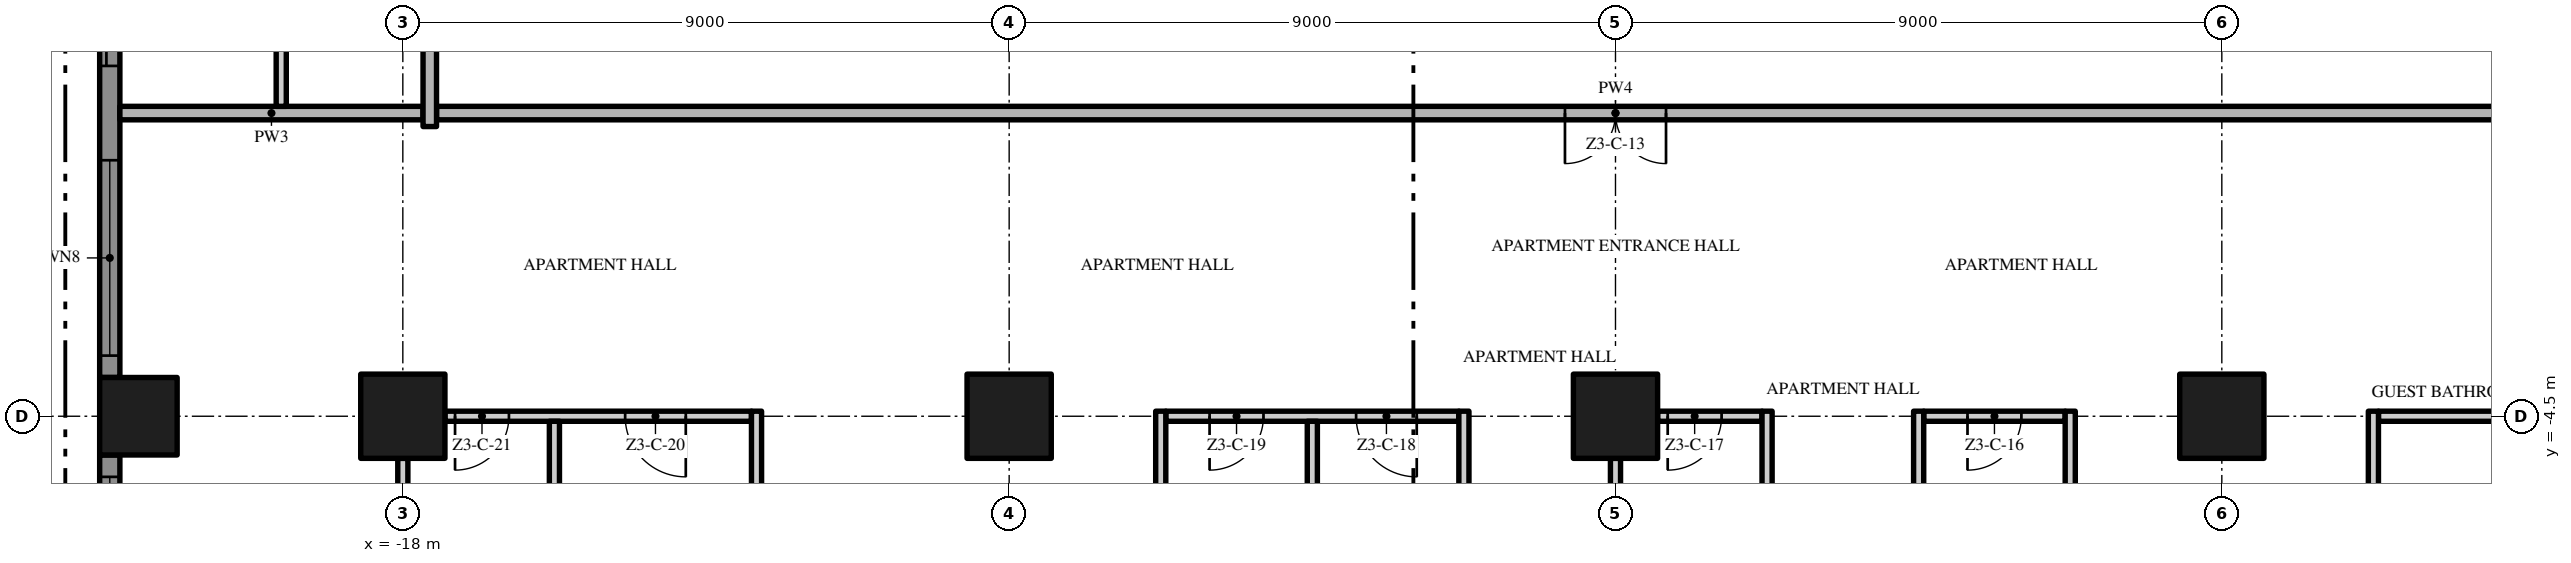
"""IFC4 building model, lengths in metres.
Left out: names, types, materials, properties, quantities, classifications, styles, units other than length and angle.
Written with IfcOpenShell. Run it as: python <this file> out.ifc"""

import sys

from ifc_helpers import new_model, si_unit, direction, frame, frame_2d, origin, origin_2d, place, context, subcontext, project, spatial, polyline, rectangle, outline, extrude, element, fill, save


model = new_model("IFC4")
c1 = context("Model", 3, precision=1e-05, world=origin(), true_north=direction((0.0, 1.0)))
c2 = subcontext(c1, "Body", "Model", "MODEL_VIEW")
j1 = project(units=[si_unit("LENGTHUNIT", "METRE"), si_unit("PLANEANGLEUNIT", "RADIAN")], contexts=[c1])
p1 = place(None, origin())
s1 = spatial("IfcSite", under=j1, at=p1, CompositionType="ELEMENT")
p2 = place(p1, origin())
s2 = spatial("IfcBuilding", under=s1, at=p2, CompositionType="ELEMENT")
p3 = place(p2, frame((0.0, 0.0, 147.8)))
s3 = spatial("IfcBuildingStorey", under=s2, at=p3, CompositionType="ELEMENT", Elevation=147.8)
p4 = place(p3, frame((-18.0, -4.5, 0.0), z_axis=(0.0, 0.0, 1.0), x_axis=(1.0, 0.0, 0.0)))
e1 = element("IfcColumn", 1, at=p4, inside=s3, PredefinedType="COLUMN", context=c2, shape_type="SweptSolid", body=[
    extrude(rectangle(XDim=1.25, YDim=1.25, at=origin_2d()), origin(), (0.0, 0.0, 1.0), 3.5),
])
p5 = place(p3, frame((-21.925, -4.5, 0.0), z_axis=(0.0, 0.0, 1.0), x_axis=(1.0, 0.0, 0.0)))
e2 = element("IfcColumn", 2, at=p5, inside=s3, PredefinedType="COLUMN", context=c2, shape_type="SweptSolid", body=[
    extrude(rectangle(XDim=1.15, YDim=1.15, at=origin_2d()), origin(), (0.0, 0.0, 1.0), 3.5),
])
for number, where, z_axis, x_axis in (
    (3, (-9.0, -4.5, 0.0), (0.0, 0.0, 1.0), (1.0, 0.0, 0.0)),
    (4, (0.0, -4.5, 0.0), (0.0, 0.0, 1.0), (1.0, 0.0, 0.0)),
    (5, (9.0, -4.5, 0.0), (0.0, 0.0, 1.0), (1.0, 0.0, 0.0)),
):
    element("IfcColumn", number, at=place(p3, frame(where, z_axis=z_axis, x_axis=x_axis)), inside=s3, PredefinedType="COLUMN", context=c2, shape_type="SweptSolid", body=[
        extrude(rectangle(XDim=1.25, YDim=1.25, at=origin_2d()), origin(), (0.0, 0.0, 1.0), 3.5),
    ])
p6 = place(p3, frame((-22.35, -3.925, 0.0), z_axis=(0.0, 0.0, 1.0), x_axis=(0.0, 1.0, 0.0)))
e6 = element("IfcWall", 6, at=p6, inside=s3, PredefinedType="SOLIDWALL", context=c2, shape_type="SweptSolid", body=[
    extrude(rectangle(XDim=7.85, YDim=0.3, at=frame_2d((3.925, 0.0))), origin(), (0.0, 0.0, 1.0), 3.5),
])
p7 = place(p6, frame((4.625, 0.0, 0.0)))
e7 = element("IfcOpeningElement", 7, at=p7, cuts=e6, PredefinedType="OPENING", context=c2, shape_type="SweptSolid", body=[
    extrude(rectangle(XDim=2.9, YDim=2.4, at=frame_2d((1.45, 1.2))), frame((0.0, 0.16, 0.0), z_axis=(0.0, -1.0, 0.0), x_axis=(1.0, 0.0, 0.0)), (0.0, 0.0, 1.0), 0.32),
])
p8 = place(p6, frame((0.325, 0.0, 0.45)))
e8 = element("IfcOpeningElement", 8, at=p8, cuts=e6, PredefinedType="OPENING", context=c2, shape_type="SweptSolid", body=[
    extrude(rectangle(XDim=2.9, YDim=2.65, at=frame_2d((1.45, 1.325))), frame((0.0, 0.16, 0.0), z_axis=(0.0, -1.0, 0.0), x_axis=(1.0, 0.0, 0.0)), (0.0, 0.0, 1.0), 0.32),
])
p9 = place(p3, frame((-22.35, -12.35, 0.0), z_axis=(0.0, 0.0, 1.0), x_axis=(0.0, 1.0, 0.0)))
e9 = element("IfcWall", 9, at=p9, inside=s3, PredefinedType="SOLIDWALL", context=c2, shape_type="SweptSolid", body=[
    extrude(rectangle(XDim=7.275, YDim=0.3, at=frame_2d((3.638, 0.0))), origin(), (0.0, 0.0, 1.0), 3.5),
])
p10 = place(p9, frame((4.05, 0.0, 0.45)))
e10 = element("IfcOpeningElement", 10, at=p10, cuts=e9, PredefinedType="OPENING", context=c2, shape_type="SweptSolid", body=[
    extrude(rectangle(XDim=2.9, YDim=2.65, at=frame_2d((1.45, 1.325))), frame((0.0, 0.16, 0.0), z_axis=(0.0, -1.0, 0.0), x_axis=(1.0, 0.0, 0.0)), (0.0, 0.0, 1.0), 0.32),
])
p11 = place(p9, frame((0.3, 0.0, 0.0)))
e11 = element("IfcOpeningElement", 11, at=p11, cuts=e9, PredefinedType="OPENING", context=c2, shape_type="SweptSolid", body=[
    extrude(rectangle(XDim=2.35, YDim=2.4, at=frame_2d((1.175, 1.2))), frame((0.0, 0.16, 0.0), z_axis=(0.0, -1.0, 0.0), x_axis=(1.0, 0.0, 0.0)), (0.0, 0.0, 1.0), 0.32),
])
p12 = place(p3, origin())
e12 = element("IfcWall", 12, at=p12, inside=s3, PredefinedType="USERDEFINED", context=c2, shape_type="SweptSolid", body=[
    extrude(outline(polyline([(-25.149, 18.0), (-25.485, 16.5), (-25.5, 16.125), (-25.369, 15.0), (-24.845, 13.5), (-24.112, 12.0), (-23.451, 10.5), (-23.115, 9.0), (-23.1, 8.625), (-23.231, 7.5), (-23.755, 6.0), (-24.488, 4.5), (-25.149, 3.0), (-25.485, 1.5), (-25.5, 1.125), (-25.369, 0.0), (-24.845, -1.5), (-24.112, -3.0), (-23.451, -4.5), (-23.115, -6.0), (-23.1, -6.375), (-23.231, -7.5), (-23.755, -9.0), (-24.488, -10.5), (-25.149, -12.0), (-25.485, -13.5), (-25.241, -13.555), (-24.91, -12.079), (-24.261, -10.605), (-23.524, -9.096), (-22.986, -7.556), (-22.849, -6.385), (-22.866, -5.967), (-23.213, -4.421), (-23.885, -2.895), (-24.614, -1.404), (-25.124, 0.056), (-25.249, 1.135), (-25.236, 1.467), (-24.91, 2.921), (-24.261, 4.395), (-23.524, 5.904), (-22.986, 7.444), (-22.849, 8.615), (-22.866, 9.033), (-23.213, 10.579), (-23.885, 12.105), (-24.614, 13.596), (-25.124, 15.056), (-25.249, 16.135), (-25.236, 16.467), (-24.905, 17.945), (-25.149, 18.0)])), origin(), (0.0, 0.0, 1.0), 0.9),
])
p13 = place(p3, frame((-12.825, -4.5, 0.0), z_axis=(0.0, 0.0, 1.0), x_axis=(-1.0, 0.0, 0.0)))
e13 = element("IfcWall", 13, at=p13, inside=s3, PredefinedType="PARTITIONING", context=c2, shape_type="SweptSolid", body=[
    extrude(rectangle(XDim=4.55, YDim=0.15, at=frame_2d((2.275, 0.0))), origin(), (0.0, 0.0, 1.0), 3.5),
])
p14 = place(p13, frame((0.975, 0.0, 0.0)))
e14 = element("IfcOpeningElement", 14, at=p14, cuts=e13, PredefinedType="OPENING", context=c2, shape_type="SweptSolid", body=[
    extrude(rectangle(XDim=0.9, YDim=2.1, at=frame_2d((0.45, 1.05))), frame((0.0, 0.085, 0.0), z_axis=(0.0, -1.0, 0.0), x_axis=(1.0, 0.0, 0.0)), (0.0, 0.0, 1.0), 0.17),
])
p15 = place(p13, frame((3.6, 0.0, 0.0)))
e15 = element("IfcOpeningElement", 15, at=p15, cuts=e13, PredefinedType="OPENING", context=c2, shape_type="SweptSolid", body=[
    extrude(rectangle(XDim=0.8, YDim=2.0, at=frame_2d((0.4, 1.0))), frame((0.0, 0.085, 0.0), z_axis=(0.0, -1.0, 0.0), x_axis=(1.0, 0.0, 0.0)), (0.0, 0.0, 1.0), 0.17),
])
p16 = place(p3, frame((-2.325, -4.5, 0.0), z_axis=(0.0, 0.0, 1.0), x_axis=(-1.0, 0.0, 0.0)))
e16 = element("IfcWall", 16, at=p16, inside=s3, PredefinedType="PARTITIONING", context=c2, shape_type="SweptSolid", body=[
    extrude(rectangle(XDim=4.35, YDim=0.15, at=frame_2d((2.175, 0.0))), origin(), (0.0, 0.0, 1.0), 3.5),
])
p17 = place(p16, frame((0.625, 0.0, 0.0)))
e17 = element("IfcOpeningElement", 17, at=p17, cuts=e16, PredefinedType="OPENING", context=c2, shape_type="SweptSolid", body=[
    extrude(rectangle(XDim=0.9, YDim=2.1, at=frame_2d((0.45, 1.05))), frame((0.0, 0.085, 0.0), z_axis=(0.0, -1.0, 0.0), x_axis=(1.0, 0.0, 0.0)), (0.0, 0.0, 1.0), 0.17),
])
p18 = place(p16, frame((2.9, 0.0, 0.0)))
e18 = element("IfcOpeningElement", 18, at=p18, cuts=e16, PredefinedType="OPENING", context=c2, shape_type="SweptSolid", body=[
    extrude(rectangle(XDim=0.8, YDim=2.0, at=frame_2d((0.4, 1.0))), frame((0.0, 0.085, 0.0), z_axis=(0.0, -1.0, 0.0), x_axis=(1.0, 0.0, 0.0)), (0.0, 0.0, 1.0), 0.17),
])
p19 = place(p3, frame((2.175, -4.5, 0.0), z_axis=(0.0, 0.0, 1.0), x_axis=(-1.0, 0.0, 0.0)))
e19 = element("IfcWall", 19, at=p19, inside=s3, PredefinedType="PARTITIONING", context=c2, shape_type="SweptSolid", body=[
    extrude(rectangle(XDim=1.55, YDim=0.15, at=frame_2d((0.775, 0.0))), origin(), (0.0, 0.0, 1.0), 3.5),
])
p20 = place(p19, frame((0.6, 0.0, 0.0)))
e20 = element("IfcOpeningElement", 20, at=p20, cuts=e19, PredefinedType="OPENING", context=c2, shape_type="SweptSolid", body=[
    extrude(rectangle(XDim=0.8, YDim=2.0, at=frame_2d((0.4, 1.0))), frame((0.0, 0.085, 0.0), z_axis=(0.0, -1.0, 0.0), x_axis=(1.0, 0.0, 0.0)), (0.0, 0.0, 1.0), 0.17),
])
p21 = place(p3, frame((6.675, -4.5, 0.0), z_axis=(0.0, 0.0, 1.0), x_axis=(-1.0, 0.0, 0.0)))
e21 = element("IfcWall", 21, at=p21, inside=s3, PredefinedType="PARTITIONING", context=c2, shape_type="SweptSolid", body=[
    extrude(rectangle(XDim=2.1, YDim=0.15, at=frame_2d((1.05, 0.0))), origin(), (0.0, 0.0, 1.0), 3.5),
])
p22 = place(p21, frame((0.65, 0.0, 0.0)))
e22 = element("IfcOpeningElement", 22, at=p22, cuts=e21, PredefinedType="OPENING", context=c2, shape_type="SweptSolid", body=[
    extrude(rectangle(XDim=0.8, YDim=2.0, at=frame_2d((0.4, 1.0))), frame((0.0, 0.085, 0.0), z_axis=(0.0, -1.0, 0.0), x_axis=(1.0, 0.0, 0.0)), (0.0, 0.0, 1.0), 0.17),
])
p23 = place(p3, frame((11.325, -4.5, 0.0), z_axis=(0.0, 0.0, 1.0), x_axis=(1.0, 0.0, 0.0)))
e23 = element("IfcWall", 23, at=p23, inside=s3, PredefinedType="PARTITIONING", context=c2, shape_type="SweptSolid", body=[
    extrude(rectangle(XDim=2.1, YDim=0.15, at=frame_2d((1.05, 0.0))), origin(), (0.0, 0.0, 1.0), 3.5),
])
p24 = place(p3, frame((17.5, 0.0, 0.0), z_axis=(0.0, 0.0, 1.0), x_axis=(-1.0, 0.0, 0.0)))
e24 = element("IfcWall", 24, at=p24, inside=s3, PredefinedType="PARTITIONING", context=c2, shape_type="SweptSolid", body=[
    extrude(rectangle(XDim=35.0, YDim=0.2, at=frame_2d((17.5, 0.0))), origin(), (0.0, 0.0, 1.0), 3.5),
])
p25 = place(p24, frame((16.75, 0.0, 0.0)))
e25 = element("IfcOpeningElement", 25, at=p25, cuts=e24, PredefinedType="OPENING", context=c2, shape_type="SweptSolid", body=[
    extrude(rectangle(XDim=1.5, YDim=2.4, at=frame_2d((0.75, 1.2))), frame((0.0, 0.11, 0.0), z_axis=(0.0, -1.0, 0.0), x_axis=(1.0, 0.0, 0.0)), (0.0, 0.0, 1.0), 0.22),
])
p26 = place(p3, frame((-22.2, 0.0, 0.0), z_axis=(0.0, 0.0, 1.0), x_axis=(1.0, 0.0, 0.0)))
e26 = element("IfcWall", 26, at=p26, inside=s3, PredefinedType="PARTITIONING", context=c2, shape_type="SweptSolid", body=[
    extrude(rectangle(XDim=4.5, YDim=0.2, at=frame_2d((2.25, 0.0))), origin(), (0.0, 0.0, 1.0), 3.5),
])
p27 = place(p3, frame((-19.805, 0.1, 0.0), z_axis=(0.0, 0.0, 1.0), x_axis=(0.0, 1.0, 0.0)))
e27 = element("IfcWall", 27, at=p27, inside=s3, PredefinedType="PARTITIONING", context=c2, shape_type="SweptSolid", body=[
    extrude(rectangle(XDim=2.225, YDim=0.15, at=frame_2d((1.113, 0.0))), origin(), (0.0, 0.0, 1.0), 3.5),
])
p28 = place(p3, frame((-18.0, -12.875, 0.0), z_axis=(0.0, 0.0, 1.0), x_axis=(0.0, 1.0, 0.0)))
e28 = element("IfcWall", 28, at=p28, inside=s3, PredefinedType="PARTITIONING", context=c2, shape_type="SweptSolid", body=[
    extrude(rectangle(XDim=7.75, YDim=0.15, at=frame_2d((3.875, 0.0))), origin(), (0.0, 0.0, 1.0), 3.5),
])
p29 = place(p3, frame((-17.6, -0.2, 0.0), z_axis=(0.0, 0.0, 1.0), x_axis=(0.0, 1.0, 0.0)))
e29 = element("IfcWall", 29, at=p29, inside=s3, PredefinedType="PARTITIONING", context=c2, shape_type="SweptSolid", body=[
    extrude(rectangle(XDim=4.075, YDim=0.2, at=frame_2d((2.038, 0.0))), origin(), (0.0, 0.0, 1.0), 3.5),
])
p30 = place(p3, frame((-15.75, -8.925, 0.0), z_axis=(0.0, 0.0, 1.0), x_axis=(0.0, 1.0, 0.0)))
e30 = element("IfcWall", 30, at=p30, inside=s3, PredefinedType="PARTITIONING", context=c2, shape_type="SweptSolid", body=[
    extrude(rectangle(XDim=4.35, YDim=0.15, at=frame_2d((2.175, 0.0))), origin(), (0.0, 0.0, 1.0), 3.5),
])
p31 = place(p3, frame((-12.75, -8.925, 0.0), z_axis=(0.0, 0.0, 1.0), x_axis=(0.0, 1.0, 0.0)))
e31 = element("IfcWall", 31, at=p31, inside=s3, PredefinedType="PARTITIONING", context=c2, shape_type="SweptSolid", body=[
    extrude(rectangle(XDim=4.5, YDim=0.15, at=frame_2d((2.25, 0.0))), origin(), (0.0, 0.0, 1.0), 3.5),
])
p32 = place(p3, frame((-6.75, -12.075, 0.0), z_axis=(0.0, 0.0, 1.0), x_axis=(0.0, 1.0, 0.0)))
e32 = element("IfcWall", 32, at=p32, inside=s3, PredefinedType="PARTITIONING", context=c2, shape_type="SweptSolid", body=[
    extrude(rectangle(XDim=7.65, YDim=0.15, at=frame_2d((3.825, 0.0))), origin(), (0.0, 0.0, 1.0), 3.5),
])
p33 = place(p3, frame((-4.5, -17.7, 0.0), z_axis=(0.0, 0.0, 1.0), x_axis=(0.0, 1.0, 0.0)))
e33 = element("IfcWall", 33, at=p33, inside=s3, PredefinedType="PARTITIONING", context=c2, shape_type="SweptSolid", body=[
    extrude(rectangle(XDim=13.125, YDim=0.15, at=frame_2d((6.562, 0.0))), origin(), (0.0, 0.0, 1.0), 3.5),
])
p34 = place(p3, frame((-2.25, -12.075, 0.0), z_axis=(0.0, 0.0, 1.0), x_axis=(0.0, 1.0, 0.0)))
e34 = element("IfcWall", 34, at=p34, inside=s3, PredefinedType="PARTITIONING", context=c2, shape_type="SweptSolid", body=[
    extrude(rectangle(XDim=7.65, YDim=0.15, at=frame_2d((3.825, 0.0))), origin(), (0.0, 0.0, 1.0), 3.5),
])
p35 = place(p3, frame((0.0, -12.875, 0.0), z_axis=(0.0, 0.0, 1.0), x_axis=(0.0, 1.0, 0.0)))
e35 = element("IfcWall", 35, at=p35, inside=s3, PredefinedType="PARTITIONING", context=c2, shape_type="SweptSolid", body=[
    extrude(rectangle(XDim=7.75, YDim=0.15, at=frame_2d((3.875, 0.0))), origin(), (0.0, 0.0, 1.0), 3.5),
])
p36 = place(p3, frame((2.25, -8.925, 0.0), z_axis=(0.0, 0.0, 1.0), x_axis=(0.0, 1.0, 0.0)))
e36 = element("IfcWall", 36, at=p36, inside=s3, PredefinedType="PARTITIONING", context=c2, shape_type="SweptSolid", body=[
    extrude(rectangle(XDim=4.5, YDim=0.15, at=frame_2d((2.25, 0.0))), origin(), (0.0, 0.0, 1.0), 3.5),
])
p37 = place(p3, frame((4.5, -17.7, 0.0), z_axis=(0.0, 0.0, 1.0), x_axis=(0.0, 1.0, 0.0)))
e37 = element("IfcWall", 37, at=p37, inside=s3, PredefinedType="PARTITIONING", context=c2, shape_type="SweptSolid", body=[
    extrude(rectangle(XDim=13.275, YDim=0.15, at=frame_2d((6.638, 0.0))), origin(), (0.0, 0.0, 1.0), 3.5),
])
for number, where, z_axis, x_axis in (
    (38, (6.75, -12.075, 0.0), (0.0, 0.0, 1.0), (0.0, 1.0, 0.0)),
    (39, (11.25, -12.075, 0.0), (0.0, 0.0, 1.0), (0.0, 1.0, 0.0)),
):
    element("IfcWall", number, at=place(p3, frame(where, z_axis=z_axis, x_axis=x_axis)), inside=s3, PredefinedType="PARTITIONING", context=c2, shape_type="SweptSolid", body=[
        extrude(rectangle(XDim=7.65, YDim=0.15, at=frame_2d((3.825, 0.0))), origin(), (0.0, 0.0, 1.0), 3.5),
    ])
p38 = place(p7, origin())
e40 = element("IfcDoor", 40, at=p38, inside=s3, OperationType="SINGLE_SWING_LEFT", PredefinedType="DOOR", context=c2, shape_type="SweptSolid", body=[
    extrude(rectangle(XDim=2.9, YDim=2.4, at=frame_2d((1.45, 1.2))), frame((0.0, 0.025, 0.0), z_axis=(0.0, -1.0, 0.0), x_axis=(1.0, 0.0, 0.0)), (0.0, 0.0, 1.0), 0.05),
])
fill(e7, e40)
p39 = place(p8, origin())
e41 = element("IfcWindow", 41, at=p39, inside=s3, PartitioningType="SINGLE_PANEL", PredefinedType="WINDOW", context=c2, shape_type="SweptSolid", body=[
    extrude(rectangle(XDim=2.9, YDim=2.65, at=frame_2d((1.45, 1.325))), frame((0.0, 0.03, 0.0), z_axis=(0.0, -1.0, 0.0), x_axis=(1.0, 0.0, 0.0)), (0.0, 0.0, 1.0), 0.06),
])
fill(e8, e41)
p40 = place(p10, origin())
e42 = element("IfcWindow", 42, at=p40, inside=s3, PartitioningType="SINGLE_PANEL", PredefinedType="WINDOW", context=c2, shape_type="SweptSolid", body=[
    extrude(rectangle(XDim=2.9, YDim=2.65, at=frame_2d((1.45, 1.325))), frame((0.0, 0.03, 0.0), z_axis=(0.0, -1.0, 0.0), x_axis=(1.0, 0.0, 0.0)), (0.0, 0.0, 1.0), 0.06),
])
fill(e10, e42)
p41 = place(p25, origin())
e43 = element("IfcDoor", 43, at=p41, inside=s3, OperationType="DOUBLE_DOOR_SINGLE_SWING", PredefinedType="DOOR", context=c2, shape_type="SweptSolid", body=[
    extrude(rectangle(XDim=1.5, YDim=2.4, at=frame_2d((0.75, 1.2))), frame((0.0, 0.025, 0.0), z_axis=(0.0, -1.0, 0.0), x_axis=(1.0, 0.0, 0.0)), (0.0, 0.0, 1.0), 0.05),
])
fill(e25, e43)
p42 = place(p22, origin())
e44 = element("IfcDoor", 44, at=p42, inside=s3, OperationType="SINGLE_SWING_RIGHT", PredefinedType="DOOR", context=c2, shape_type="SweptSolid", body=[
    extrude(rectangle(XDim=0.8, YDim=2.0, at=frame_2d((0.4, 1.0))), frame((0.0, 0.025, 0.0), z_axis=(0.0, -1.0, 0.0), x_axis=(1.0, 0.0, 0.0)), (0.0, 0.0, 1.0), 0.05),
])
fill(e22, e44)
p43 = place(p20, origin())
e45 = element("IfcDoor", 45, at=p43, inside=s3, OperationType="SINGLE_SWING_RIGHT", PredefinedType="DOOR", context=c2, shape_type="SweptSolid", body=[
    extrude(rectangle(XDim=0.8, YDim=2.0, at=frame_2d((0.4, 1.0))), frame((0.0, 0.025, 0.0), z_axis=(0.0, -1.0, 0.0), x_axis=(1.0, 0.0, 0.0)), (0.0, 0.0, 1.0), 0.05),
])
fill(e20, e45)
p44 = place(p17, origin())
e46 = element("IfcDoor", 46, at=p44, inside=s3, OperationType="SINGLE_SWING_LEFT", PredefinedType="DOOR", context=c2, shape_type="SweptSolid", body=[
    extrude(rectangle(XDim=0.9, YDim=2.1, at=frame_2d((0.45, 1.05))), frame((0.0, 0.025, 0.0), z_axis=(0.0, -1.0, 0.0), x_axis=(1.0, 0.0, 0.0)), (0.0, 0.0, 1.0), 0.05),
])
fill(e17, e46)
p45 = place(p18, origin())
e47 = element("IfcDoor", 47, at=p45, inside=s3, OperationType="SINGLE_SWING_RIGHT", PredefinedType="DOOR", context=c2, shape_type="SweptSolid", body=[
    extrude(rectangle(XDim=0.8, YDim=2.0, at=frame_2d((0.4, 1.0))), frame((0.0, 0.025, 0.0), z_axis=(0.0, -1.0, 0.0), x_axis=(1.0, 0.0, 0.0)), (0.0, 0.0, 1.0), 0.05),
])
fill(e18, e47)
p46 = place(p14, origin())
e48 = element("IfcDoor", 48, at=p46, inside=s3, OperationType="SINGLE_SWING_LEFT", PredefinedType="DOOR", context=c2, shape_type="SweptSolid", body=[
    extrude(rectangle(XDim=0.9, YDim=2.1, at=frame_2d((0.45, 1.05))), frame((0.0, 0.025, 0.0), z_axis=(0.0, -1.0, 0.0), x_axis=(1.0, 0.0, 0.0)), (0.0, 0.0, 1.0), 0.05),
])
fill(e14, e48)
p47 = place(p15, origin())
e49 = element("IfcDoor", 49, at=p47, inside=s3, OperationType="SINGLE_SWING_RIGHT", PredefinedType="DOOR", context=c2, shape_type="SweptSolid", body=[
    extrude(rectangle(XDim=0.8, YDim=2.0, at=frame_2d((0.4, 1.0))), frame((0.0, 0.025, 0.0), z_axis=(0.0, -1.0, 0.0), x_axis=(1.0, 0.0, 0.0)), (0.0, 0.0, 1.0), 0.05),
])
fill(e15, e49)
save(model, sys.argv[1])
